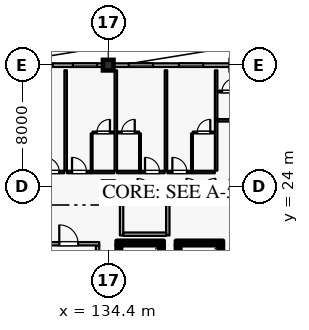
"""IFC4 building model, lengths in metres.
Left out: names, types, materials, properties, quantities, classifications, styles, units other than length and angle.
Written with IfcOpenShell. Run it as: python <this file> out.ifc"""

import sys

from ifc_helpers import new_model, si_unit, direction, frame, frame_2d, origin, origin_2d, place, context, subcontext, project, spatial, rectangle, extrude, element, fill, save


model = new_model("IFC4")
c1 = context("Model", 3, precision=1e-05, world=origin(), true_north=direction((0.0, 1.0)))
c2 = subcontext(c1, "Body", "Model", "MODEL_VIEW")
j1 = project(units=[si_unit("LENGTHUNIT", "METRE"), si_unit("PLANEANGLEUNIT", "RADIAN")], contexts=[c1])
p1 = place(None, origin())
s1 = spatial("IfcSite", under=j1, at=p1, CompositionType="ELEMENT")
p2 = place(p1, origin())
s2 = spatial("IfcBuilding", under=s1, at=p2, CompositionType="ELEMENT")
p3 = place(p2, frame((0.0, 0.0, 28.8)))
s3 = spatial("IfcBuildingStorey", under=s2, at=p3, CompositionType="ELEMENT", Elevation=28.8)
for number, where, z_axis, x_axis in (
    (1, (134.4, 32.0, 0.0), (0.0, 0.0, 1.0), (1.0, 0.0, 0.0)),
    (2, (134.4, 24.0, 0.0), (0.0, 0.0, 1.0), (1.0, 0.0, 0.0)),
):
    element("IfcColumn", number, at=place(p3, frame(where, z_axis=z_axis, x_axis=x_axis)), inside=s3, PredefinedType="COLUMN", context=c2, shape_type="SweptSolid", body=[
        extrude(rectangle(XDim=0.7, YDim=0.7, at=origin_2d()), origin(), (0.0, 0.0, 1.0), 3.6),
    ])
p4 = place(p3, frame((126.35, 32.0, 0.0), z_axis=(0.0, 0.0, 1.0), x_axis=(1.0, 0.0, 0.0)))
e3 = element("IfcWall", 3, at=p4, inside=s3, PredefinedType="SOLIDWALL", context=c2, shape_type="SweptSolid", body=[
    extrude(rectangle(XDim=7.7, YDim=0.24, at=frame_2d((3.85, 0.0))), origin(), (0.0, 0.0, 1.0), 2.93),
])
p5 = place(p4, frame((0.125, 0.0, 0.8)))
e4 = element("IfcOpeningElement", 4, at=p5, cuts=e3, PredefinedType="OPENING", context=c2, shape_type="SweptSolid", body=[
    extrude(rectangle(XDim=1.6, YDim=1.6, at=frame_2d((0.8, 0.8))), frame((0.0, 0.13, 0.0), z_axis=(0.0, -1.0, 0.0), x_axis=(1.0, 0.0, 0.0)), (0.0, 0.0, 1.0), 0.26),
])
p6 = place(p4, frame((2.8, 0.0, 0.8)))
e5 = element("IfcOpeningElement", 5, at=p6, cuts=e3, PredefinedType="OPENING", context=c2, shape_type="SweptSolid", body=[
    extrude(rectangle(XDim=1.6, YDim=1.6, at=frame_2d((0.8, 0.8))), frame((0.0, 0.13, 0.0), z_axis=(0.0, -1.0, 0.0), x_axis=(1.0, 0.0, 0.0)), (0.0, 0.0, 1.0), 0.26),
])
p7 = place(p4, frame((5.725, 0.0, 0.8)))
e6 = element("IfcOpeningElement", 6, at=p7, cuts=e3, PredefinedType="OPENING", context=c2, shape_type="SweptSolid", body=[
    extrude(rectangle(XDim=1.6, YDim=1.6, at=frame_2d((0.8, 0.8))), frame((0.0, 0.13, 0.0), z_axis=(0.0, -1.0, 0.0), x_axis=(1.0, 0.0, 0.0)), (0.0, 0.0, 1.0), 0.26),
])
p8 = place(p3, frame((134.75, 32.0, 0.0), z_axis=(0.0, 0.0, 1.0), x_axis=(1.0, 0.0, 0.0)))
e7 = element("IfcWall", 7, at=p8, inside=s3, PredefinedType="SOLIDWALL", context=c2, shape_type="SweptSolid", body=[
    extrude(rectangle(XDim=7.7, YDim=0.24, at=frame_2d((3.85, 0.0))), origin(), (0.0, 0.0, 1.0), 2.93),
])
p9 = place(p8, frame((1.0, 0.0, 0.8)))
e8 = element("IfcOpeningElement", 8, at=p9, cuts=e7, PredefinedType="OPENING", context=c2, shape_type="SweptSolid", body=[
    extrude(rectangle(XDim=1.6, YDim=1.6, at=frame_2d((0.8, 0.8))), frame((0.0, 0.13, 0.0), z_axis=(0.0, -1.0, 0.0), x_axis=(1.0, 0.0, 0.0)), (0.0, 0.0, 1.0), 0.26),
])
p10 = place(p8, frame((4.3, 0.0, 0.8)))
e9 = element("IfcOpeningElement", 9, at=p10, cuts=e7, PredefinedType="OPENING", context=c2, shape_type="SweptSolid", body=[
    extrude(rectangle(XDim=1.6, YDim=1.6, at=frame_2d((0.8, 0.8))), frame((0.0, 0.13, 0.0), z_axis=(0.0, -1.0, 0.0), x_axis=(1.0, 0.0, 0.0)), (0.0, 0.0, 1.0), 0.26),
])
p11 = place(p3, frame((137.9, 17.555, 0.0), z_axis=(0.0, 0.0, 1.0), x_axis=(0.0, 1.0, 0.0)))
e10 = element("IfcWall", 10, at=p11, inside=s3, PredefinedType="SHEAR", context=c2, shape_type="SweptSolid", body=[
    extrude(rectangle(XDim=2.59, YDim=0.3, at=frame_2d((1.295, 0.0))), origin(), (0.0, 0.0, 1.0), 3.365),
])
p12 = place(p3, frame((138.05, 20.3, 0.0), z_axis=(0.0, 0.0, 1.0), x_axis=(-1.0, 0.0, 0.0)))
e11 = element("IfcWall", 11, at=p12, inside=s3, PredefinedType="SHEAR", context=c2, shape_type="SweptSolid", body=[
    extrude(rectangle(XDim=3.1, YDim=0.3, at=frame_2d((1.55, 0.0))), origin(), (0.0, 0.0, 1.0), 3.365),
])
for number, where, z_axis, x_axis in (
    (12, (135.1, 20.145, 0.0), (0.0, 0.0, 1.0), (0.0, -1.0, 0.0)),
    (13, (141.8, 17.555, 0.0), (0.0, 0.0, 1.0), (0.0, 1.0, 0.0)),
):
    element("IfcWall", number, at=place(p3, frame(where, z_axis=z_axis, x_axis=x_axis)), inside=s3, PredefinedType="SHEAR", context=c2, shape_type="SweptSolid", body=[
        extrude(rectangle(XDim=2.59, YDim=0.3, at=frame_2d((1.295, 0.0))), origin(), (0.0, 0.0, 1.0), 3.365),
    ])
p13 = place(p3, frame((141.95, 20.3, 0.0), z_axis=(0.0, 0.0, 1.0), x_axis=(-1.0, 0.0, 0.0)))
e14 = element("IfcWall", 14, at=p13, inside=s3, PredefinedType="SHEAR", context=c2, shape_type="SweptSolid", body=[
    extrude(rectangle(XDim=3.1, YDim=0.3, at=frame_2d((1.55, 0.0))), origin(), (0.0, 0.0, 1.0), 3.365),
])
p14 = place(p3, frame((139.0, 20.145, 0.0), z_axis=(0.0, 0.0, 1.0), x_axis=(0.0, -1.0, 0.0)))
e15 = element("IfcWall", 15, at=p14, inside=s3, PredefinedType="SHEAR", context=c2, shape_type="SweptSolid", body=[
    extrude(rectangle(XDim=2.59, YDim=0.3, at=frame_2d((1.295, 0.0))), origin(), (0.0, 0.0, 1.0), 3.365),
])
p15 = place(p3, frame((133.7, 16.605, 0.0), z_axis=(0.0, 0.0, 1.0), x_axis=(0.0, 1.0, 0.0)))
e16 = element("IfcWall", 16, at=p15, inside=s3, PredefinedType="PARTITIONING", context=c2, shape_type="SweptSolid", body=[
    extrude(rectangle(XDim=3.53, YDim=0.22, at=frame_2d((1.765, 0.0))), origin(), (0.0, 0.0, 1.0), 3.365),
])
p16 = place(p3, frame((129.79, 20.25, 0.0), z_axis=(0.0, 0.0, 1.0), x_axis=(1.0, 0.0, 0.0)))
e17 = element("IfcWall", 17, at=p16, inside=s3, PredefinedType="PARTITIONING", context=c2, shape_type="SweptSolid", body=[
    extrude(rectangle(XDim=4.02, YDim=0.22, at=frame_2d((2.01, 0.0))), origin(), (0.0, 0.0, 1.0), 3.365),
])
p17 = place(p16, frame((1.39, 0.0, 0.0)))
e18 = element("IfcOpeningElement", 18, at=p17, cuts=e17, PredefinedType="OPENING", context=c2, shape_type="SweptSolid", body=[
    extrude(rectangle(XDim=1.24, YDim=2.2, at=frame_2d((0.62, 1.1))), frame((0.0, 0.12, 0.0), z_axis=(0.0, -1.0, 0.0), x_axis=(1.0, 0.0, 0.0)), (0.0, 0.0, 1.0), 0.24),
])
p18 = place(p3, frame((129.89, 24.97, 0.0), z_axis=(0.0, 0.0, 1.0), x_axis=(1.0, 0.0, 0.0)))
e19 = element("IfcWall", 19, at=p18, inside=s3, PredefinedType="PARTITIONING", context=c2, shape_type="SweptSolid", body=[
    extrude(rectangle(XDim=1.62, YDim=0.16, at=frame_2d((0.81, 0.0))), origin(), (0.0, 0.0, 1.0), 3.365),
])
p19 = place(p18, frame((0.33, 0.0, 0.0)))
e20 = element("IfcOpeningElement", 20, at=p19, cuts=e19, PredefinedType="OPENING", context=c2, shape_type="SweptSolid", body=[
    extrude(rectangle(XDim=0.96, YDim=2.2, at=frame_2d((0.48, 1.1))), frame((0.0, 0.09, 0.0), z_axis=(0.0, -1.0, 0.0), x_axis=(1.0, 0.0, 0.0)), (0.0, 0.0, 1.0), 0.18),
])
p20 = place(p3, frame((131.69, 24.97, 0.0), z_axis=(0.0, 0.0, 1.0), x_axis=(1.0, 0.0, 0.0)))
e21 = element("IfcWall", 21, at=p20, inside=s3, PredefinedType="PARTITIONING", context=c2, shape_type="SweptSolid", body=[
    extrude(rectangle(XDim=1.62, YDim=0.16, at=frame_2d((0.81, 0.0))), origin(), (0.0, 0.0, 1.0), 3.365),
])
p21 = place(p20, frame((0.33, 0.0, 0.0)))
e22 = element("IfcOpeningElement", 22, at=p21, cuts=e21, PredefinedType="OPENING", context=c2, shape_type="SweptSolid", body=[
    extrude(rectangle(XDim=0.96, YDim=2.2, at=frame_2d((0.48, 1.1))), frame((0.0, 0.09, 0.0), z_axis=(0.0, -1.0, 0.0), x_axis=(1.0, 0.0, 0.0)), (0.0, 0.0, 1.0), 0.18),
])
p22 = place(p3, frame((133.32, 24.97, 0.0), z_axis=(0.0, 0.0, 1.0), x_axis=(1.0, 0.0, 0.0)))
e23 = element("IfcWall", 23, at=p22, inside=s3, PredefinedType="PARTITIONING", context=c2, shape_type="SweptSolid", body=[
    extrude(rectangle(XDim=1.49, YDim=0.16, at=frame_2d((0.745, 0.0))), origin(), (0.0, 0.0, 1.0), 3.365),
])
p23 = place(p3, frame((133.31, 25.06, 0.0), z_axis=(0.0, 0.0, 1.0), x_axis=(0.0, 1.0, 0.0)))
e24 = element("IfcWall", 24, at=p23, inside=s3, PredefinedType="PARTITIONING", context=c2, shape_type="SweptSolid", body=[
    extrude(rectangle(XDim=2.45, YDim=0.115, at=frame_2d((1.225, 0.0))), origin(), (0.0, 0.0, 1.0), 3.365),
])
p24 = place(p3, frame((133.37, 27.57, 0.0), z_axis=(0.0, 0.0, 1.0), x_axis=(1.0, 0.0, 0.0)))
e25 = element("IfcWall", 25, at=p24, inside=s3, PredefinedType="PARTITIONING", context=c2, shape_type="SweptSolid", body=[
    extrude(rectangle(XDim=1.43, YDim=0.115, at=frame_2d((0.715, 0.0))), origin(), (0.0, 0.0, 1.0), 3.365),
])
p25 = place(p24, frame((0.285, 0.0, 0.0)))
e26 = element("IfcOpeningElement", 26, at=p25, cuts=e25, PredefinedType="OPENING", context=c2, shape_type="SweptSolid", body=[
    extrude(rectangle(XDim=0.86, YDim=2.12, at=frame_2d((0.43, 1.06))), frame((0.0, 0.067, 0.0), z_axis=(0.0, -1.0, 0.0), x_axis=(1.0, 0.0, 0.0)), (0.0, 0.0, 1.0), 0.135),
])
p26 = place(p3, frame((131.6, 25.06, 0.0), z_axis=(0.0, 0.0, 1.0), x_axis=(0.0, 1.0, 0.0)))
e27 = element("IfcWall", 27, at=p26, inside=s3, PredefinedType="PARTITIONING", context=c2, shape_type="SweptSolid", body=[
    extrude(rectangle(XDim=6.6, YDim=0.16, at=frame_2d((3.3, 0.0))), origin(), (0.0, 0.0, 1.0), 3.365),
])
p27 = place(p3, frame((134.99, 24.97, 0.0), z_axis=(0.0, 0.0, 1.0), x_axis=(1.0, 0.0, 0.0)))
e28 = element("IfcWall", 28, at=p27, inside=s3, PredefinedType="PARTITIONING", context=c2, shape_type="SweptSolid", body=[
    extrude(rectangle(XDim=1.49, YDim=0.16, at=frame_2d((0.745, 0.0))), origin(), (0.0, 0.0, 1.0), 3.365),
])
p28 = place(p3, frame((136.49, 24.97, 0.0), z_axis=(0.0, 0.0, 1.0), x_axis=(1.0, 0.0, 0.0)))
e29 = element("IfcWall", 29, at=p28, inside=s3, PredefinedType="PARTITIONING", context=c2, shape_type="SweptSolid", body=[
    extrude(rectangle(XDim=1.62, YDim=0.16, at=frame_2d((0.81, 0.0))), origin(), (0.0, 0.0, 1.0), 3.365),
])
p29 = place(p28, frame((0.33, 0.0, 0.0)))
e30 = element("IfcOpeningElement", 30, at=p29, cuts=e29, PredefinedType="OPENING", context=c2, shape_type="SweptSolid", body=[
    extrude(rectangle(XDim=0.96, YDim=2.2, at=frame_2d((0.48, 1.1))), frame((0.0, 0.09, 0.0), z_axis=(0.0, -1.0, 0.0), x_axis=(1.0, 0.0, 0.0)), (0.0, 0.0, 1.0), 0.18),
])
p30 = place(p3, frame((136.49, 25.06, 0.0), z_axis=(0.0, 0.0, 1.0), x_axis=(0.0, 1.0, 0.0)))
e31 = element("IfcWall", 31, at=p30, inside=s3, PredefinedType="PARTITIONING", context=c2, shape_type="SweptSolid", body=[
    extrude(rectangle(XDim=2.45, YDim=0.115, at=frame_2d((1.225, 0.0))), origin(), (0.0, 0.0, 1.0), 3.365),
])
p31 = place(p3, frame((135.0, 27.57, 0.0), z_axis=(0.0, 0.0, 1.0), x_axis=(1.0, 0.0, 0.0)))
e32 = element("IfcWall", 32, at=p31, inside=s3, PredefinedType="PARTITIONING", context=c2, shape_type="SweptSolid", body=[
    extrude(rectangle(XDim=1.43, YDim=0.115, at=frame_2d((0.715, 0.0))), origin(), (0.0, 0.0, 1.0), 3.365),
])
p32 = place(p31, frame((0.285, 0.0, 0.0)))
e33 = element("IfcOpeningElement", 33, at=p32, cuts=e32, PredefinedType="OPENING", context=c2, shape_type="SweptSolid", body=[
    extrude(rectangle(XDim=0.86, YDim=2.12, at=frame_2d((0.43, 1.06))), frame((0.0, 0.067, 0.0), z_axis=(0.0, -1.0, 0.0), x_axis=(1.0, 0.0, 0.0)), (0.0, 0.0, 1.0), 0.135),
])
p33 = place(p3, frame((134.9, 25.06, 0.0), z_axis=(0.0, 0.0, 1.0), x_axis=(0.0, 1.0, 0.0)))
e34 = element("IfcWall", 34, at=p33, inside=s3, PredefinedType="PARTITIONING", context=c2, shape_type="SweptSolid", body=[
    extrude(rectangle(XDim=6.6, YDim=0.16, at=frame_2d((3.3, 0.0))), origin(), (0.0, 0.0, 1.0), 3.365),
])
p34 = place(p3, frame((138.29, 24.97, 0.0), z_axis=(0.0, 0.0, 1.0), x_axis=(1.0, 0.0, 0.0)))
e35 = element("IfcWall", 35, at=p34, inside=s3, PredefinedType="PARTITIONING", context=c2, shape_type="SweptSolid", body=[
    extrude(rectangle(XDim=1.62, YDim=0.16, at=frame_2d((0.81, 0.0))), origin(), (0.0, 0.0, 1.0), 3.365),
])
p35 = place(p34, frame((0.33, 0.0, 0.0)))
e36 = element("IfcOpeningElement", 36, at=p35, cuts=e35, PredefinedType="OPENING", context=c2, shape_type="SweptSolid", body=[
    extrude(rectangle(XDim=0.96, YDim=2.2, at=frame_2d((0.48, 1.1))), frame((0.0, 0.09, 0.0), z_axis=(0.0, -1.0, 0.0), x_axis=(1.0, 0.0, 0.0)), (0.0, 0.0, 1.0), 0.18),
])
p36 = place(p3, frame((139.92, 24.97, 0.0), z_axis=(0.0, 0.0, 1.0), x_axis=(1.0, 0.0, 0.0)))
e37 = element("IfcWall", 37, at=p36, inside=s3, PredefinedType="PARTITIONING", context=c2, shape_type="SweptSolid", body=[
    extrude(rectangle(XDim=1.49, YDim=0.16, at=frame_2d((0.745, 0.0))), origin(), (0.0, 0.0, 1.0), 3.365),
])
p37 = place(p3, frame((139.91, 25.06, 0.0), z_axis=(0.0, 0.0, 1.0), x_axis=(0.0, 1.0, 0.0)))
e38 = element("IfcWall", 38, at=p37, inside=s3, PredefinedType="PARTITIONING", context=c2, shape_type="SweptSolid", body=[
    extrude(rectangle(XDim=2.45, YDim=0.115, at=frame_2d((1.225, 0.0))), origin(), (0.0, 0.0, 1.0), 3.365),
])
p38 = place(p3, frame((139.97, 27.57, 0.0), z_axis=(0.0, 0.0, 1.0), x_axis=(1.0, 0.0, 0.0)))
e39 = element("IfcWall", 39, at=p38, inside=s3, PredefinedType="PARTITIONING", context=c2, shape_type="SweptSolid", body=[
    extrude(rectangle(XDim=1.43, YDim=0.115, at=frame_2d((0.715, 0.0))), origin(), (0.0, 0.0, 1.0), 3.365),
])
p39 = place(p38, frame((0.285, 0.0, 0.0)))
e40 = element("IfcOpeningElement", 40, at=p39, cuts=e39, PredefinedType="OPENING", context=c2, shape_type="SweptSolid", body=[
    extrude(rectangle(XDim=0.86, YDim=2.12, at=frame_2d((0.43, 1.06))), frame((0.0, 0.067, 0.0), z_axis=(0.0, -1.0, 0.0), x_axis=(1.0, 0.0, 0.0)), (0.0, 0.0, 1.0), 0.135),
])
p40 = place(p3, frame((138.2, 25.06, 0.0), z_axis=(0.0, 0.0, 1.0), x_axis=(0.0, 1.0, 0.0)))
e41 = element("IfcWall", 41, at=p40, inside=s3, PredefinedType="PARTITIONING", context=c2, shape_type="SweptSolid", body=[
    extrude(rectangle(XDim=6.6, YDim=0.16, at=frame_2d((3.3, 0.0))), origin(), (0.0, 0.0, 1.0), 3.365),
])
p41 = place(p3, frame((141.5, 25.06, 0.0), z_axis=(0.0, 0.0, 1.0), x_axis=(0.0, 1.0, 0.0)))
e42 = element("IfcWall", 42, at=p41, inside=s3, PredefinedType="PARTITIONING", context=c2, shape_type="SweptSolid", body=[
    extrude(rectangle(XDim=3.39, YDim=0.16, at=frame_2d((1.695, 0.0))), origin(), (0.0, 0.0, 1.0), 3.365),
])
p42 = place(p3, frame((141.59, 28.37, 0.0), z_axis=(0.0, 0.0, 1.0), x_axis=(1.0, 0.0, 0.0)))
e43 = element("IfcWall", 43, at=p42, inside=s3, PredefinedType="PARTITIONING", context=c2, shape_type="SweptSolid", body=[
    extrude(rectangle(XDim=1.49, YDim=0.16, at=frame_2d((0.745, 0.0))), origin(), (0.0, 0.0, 1.0), 3.365),
])
p43 = place(p3, frame((141.6, 30.26, 0.0), z_axis=(0.0, 0.0, 1.0), x_axis=(1.0, 0.0, 0.0)))
e44 = element("IfcWall", 44, at=p43, inside=s3, PredefinedType="PARTITIONING", context=c2, shape_type="SweptSolid", body=[
    extrude(rectangle(XDim=1.43, YDim=0.115, at=frame_2d((0.715, 0.0))), origin(), (0.0, 0.0, 1.0), 3.365),
])
p44 = place(p43, frame((0.285, 0.0, 0.0)))
e45 = element("IfcOpeningElement", 45, at=p44, cuts=e44, PredefinedType="OPENING", context=c2, shape_type="SweptSolid", body=[
    extrude(rectangle(XDim=0.86, YDim=2.12, at=frame_2d((0.43, 1.06))), frame((0.0, 0.067, 0.0), z_axis=(0.0, -1.0, 0.0), x_axis=(1.0, 0.0, 0.0)), (0.0, 0.0, 1.0), 0.135),
])
p45 = place(p3, frame((141.5, 28.46, 0.0), z_axis=(0.0, 0.0, 1.0), x_axis=(0.0, 1.0, 0.0)))
e46 = element("IfcWall", 46, at=p45, inside=s3, PredefinedType="PARTITIONING", context=c2, shape_type="SweptSolid", body=[
    extrude(rectangle(XDim=3.2, YDim=0.16, at=frame_2d((1.6, 0.0))), origin(), (0.0, 0.0, 1.0), 3.365),
])
p46 = place(p3, frame((138.96, 23.6, 0.0), z_axis=(0.0, 0.0, 1.0), x_axis=(1.0, 0.0, 0.0)))
e47 = element("IfcWall", 47, at=p46, inside=s3, PredefinedType="PARTITIONING", context=c2, shape_type="SweptSolid", body=[
    extrude(rectangle(XDim=3.08, YDim=0.14, at=frame_2d((1.54, 0.0))), origin(), (0.0, 0.0, 1.0), 3.365),
])
p47 = place(p46, frame((0.59, 0.0, 0.0)))
e48 = element("IfcOpeningElement", 48, at=p47, cuts=e47, PredefinedType="OPENING", context=c2, shape_type="SweptSolid", body=[
    extrude(rectangle(XDim=1.9, YDim=2.4, at=frame_2d((0.95, 1.2))), frame((0.0, 0.08, 0.0), z_axis=(0.0, -1.0, 0.0), x_axis=(1.0, 0.0, 0.0)), (0.0, 0.0, 1.0), 0.16),
])
p48 = place(p3, frame((135.36, 23.6, 0.0), z_axis=(0.0, 0.0, 1.0), x_axis=(1.0, 0.0, 0.0)))
e49 = element("IfcWall", 49, at=p48, inside=s3, PredefinedType="PARTITIONING", context=c2, shape_type="SweptSolid", body=[
    extrude(rectangle(XDim=2.88, YDim=0.22, at=frame_2d((1.44, 0.0))), origin(), (0.0, 0.0, 1.0), 3.365),
])
p49 = place(p48, frame((0.97, 0.0, 0.0)))
e50 = element("IfcOpeningElement", 50, at=p49, cuts=e49, PredefinedType="OPENING", context=c2, shape_type="SweptSolid", body=[
    extrude(rectangle(XDim=0.94, YDim=2.15, at=frame_2d((0.47, 1.075))), frame((0.0, 0.12, 0.0), z_axis=(0.0, -1.0, 0.0), x_axis=(1.0, 0.0, 0.0)), (0.0, 0.0, 1.0), 0.24),
])
for number, where, z_axis, x_axis in (
    (51, (135.28, 20.8, 0.0), (0.0, 0.0, 1.0), (0.0, 1.0, 0.0)),
    (52, (138.32, 20.8, 0.0), (0.0, 0.0, 1.0), (0.0, 1.0, 0.0)),
):
    element("IfcWall", number, at=place(p3, frame(where, z_axis=z_axis, x_axis=x_axis)), inside=s3, PredefinedType="PARTITIONING", context=c2, shape_type="SweptSolid", body=[
        extrude(rectangle(XDim=2.748, YDim=0.22, at=frame_2d((1.374, 0.0))), origin(), (0.0, 0.0, 1.0), 3.365),
    ])
p50 = place(p3, frame((135.39, 20.88, 0.0), z_axis=(0.0, 0.0, 1.0), x_axis=(1.0, 0.0, 0.0)))
e53 = element("IfcWall", 53, at=p50, inside=s3, PredefinedType="PARTITIONING", context=c2, shape_type="SweptSolid", body=[
    extrude(rectangle(XDim=2.82, YDim=0.22, at=frame_2d((1.41, 0.0))), origin(), (0.0, 0.0, 1.0), 3.365),
])
p51 = place(p6, origin())
e54 = element("IfcWindow", 54, at=p51, inside=s3, PartitioningType="SINGLE_PANEL", PredefinedType="WINDOW", context=c2, shape_type="SweptSolid", body=[
    extrude(rectangle(XDim=1.6, YDim=1.6, at=frame_2d((0.8, 0.8))), frame((0.0, 0.03, 0.0), z_axis=(0.0, -1.0, 0.0), x_axis=(1.0, 0.0, 0.0)), (0.0, 0.0, 1.0), 0.06),
])
fill(e5, e54)
p52 = place(p7, origin())
e55 = element("IfcWindow", 55, at=p52, inside=s3, PartitioningType="SINGLE_PANEL", PredefinedType="WINDOW", context=c2, shape_type="SweptSolid", body=[
    extrude(rectangle(XDim=1.6, YDim=1.6, at=frame_2d((0.8, 0.8))), frame((0.0, 0.03, 0.0), z_axis=(0.0, -1.0, 0.0), x_axis=(1.0, 0.0, 0.0)), (0.0, 0.0, 1.0), 0.06),
])
fill(e6, e55)
p53 = place(p9, origin())
e56 = element("IfcWindow", 56, at=p53, inside=s3, PartitioningType="SINGLE_PANEL", PredefinedType="WINDOW", context=c2, shape_type="SweptSolid", body=[
    extrude(rectangle(XDim=1.6, YDim=1.6, at=frame_2d((0.8, 0.8))), frame((0.0, 0.03, 0.0), z_axis=(0.0, -1.0, 0.0), x_axis=(1.0, 0.0, 0.0)), (0.0, 0.0, 1.0), 0.06),
])
fill(e8, e56)
p54 = place(p10, origin())
e57 = element("IfcWindow", 57, at=p54, inside=s3, PartitioningType="SINGLE_PANEL", PredefinedType="WINDOW", context=c2, shape_type="SweptSolid", body=[
    extrude(rectangle(XDim=1.6, YDim=1.6, at=frame_2d((0.8, 0.8))), frame((0.0, 0.03, 0.0), z_axis=(0.0, -1.0, 0.0), x_axis=(1.0, 0.0, 0.0)), (0.0, 0.0, 1.0), 0.06),
])
fill(e9, e57)
p55 = place(p17, origin())
e58 = element("IfcDoor", 58, at=p55, inside=s3, OperationType="SINGLE_SWING_LEFT", PredefinedType="DOOR", context=c2, shape_type="SweptSolid", body=[
    extrude(rectangle(XDim=1.24, YDim=2.2, at=frame_2d((0.62, 1.1))), frame((0.0, 0.025, 0.0), z_axis=(0.0, -1.0, 0.0), x_axis=(1.0, 0.0, 0.0)), (0.0, 0.0, 1.0), 0.05),
])
fill(e18, e58)
p56 = place(p19, origin())
e59 = element("IfcDoor", 59, at=p56, inside=s3, OperationType="SINGLE_SWING_LEFT", PredefinedType="DOOR", context=c2, shape_type="SweptSolid", body=[
    extrude(rectangle(XDim=0.96, YDim=2.2, at=frame_2d((0.48, 1.1))), frame((0.0, 0.025, 0.0), z_axis=(0.0, -1.0, 0.0), x_axis=(1.0, 0.0, 0.0)), (0.0, 0.0, 1.0), 0.05),
])
fill(e20, e59)
p57 = place(p21, origin())
e60 = element("IfcDoor", 60, at=p57, inside=s3, OperationType="SINGLE_SWING_LEFT", PredefinedType="DOOR", context=c2, shape_type="SweptSolid", body=[
    extrude(rectangle(XDim=0.96, YDim=2.2, at=frame_2d((0.48, 1.1))), frame((0.0, 0.025, 0.0), z_axis=(0.0, -1.0, 0.0), x_axis=(1.0, 0.0, 0.0)), (0.0, 0.0, 1.0), 0.05),
])
fill(e22, e60)
p58 = place(p25, origin())
e61 = element("IfcDoor", 61, at=p58, inside=s3, OperationType="SINGLE_SWING_RIGHT", PredefinedType="DOOR", context=c2, shape_type="SweptSolid", body=[
    extrude(rectangle(XDim=0.86, YDim=2.12, at=frame_2d((0.43, 1.06))), frame((0.0, 0.025, 0.0), z_axis=(0.0, -1.0, 0.0), x_axis=(1.0, 0.0, 0.0)), (0.0, 0.0, 1.0), 0.05),
])
fill(e26, e61)
p59 = place(p29, origin())
e62 = element("IfcDoor", 62, at=p59, inside=s3, OperationType="SINGLE_SWING_LEFT", PredefinedType="DOOR", context=c2, shape_type="SweptSolid", body=[
    extrude(rectangle(XDim=0.96, YDim=2.2, at=frame_2d((0.48, 1.1))), frame((0.0, 0.025, 0.0), z_axis=(0.0, -1.0, 0.0), x_axis=(1.0, 0.0, 0.0)), (0.0, 0.0, 1.0), 0.05),
])
fill(e30, e62)
p60 = place(p32, origin())
e63 = element("IfcDoor", 63, at=p60, inside=s3, OperationType="SINGLE_SWING_RIGHT", PredefinedType="DOOR", context=c2, shape_type="SweptSolid", body=[
    extrude(rectangle(XDim=0.86, YDim=2.12, at=frame_2d((0.43, 1.06))), frame((0.0, 0.025, 0.0), z_axis=(0.0, -1.0, 0.0), x_axis=(1.0, 0.0, 0.0)), (0.0, 0.0, 1.0), 0.05),
])
fill(e33, e63)
p61 = place(p35, origin())
e64 = element("IfcDoor", 64, at=p61, inside=s3, OperationType="SINGLE_SWING_LEFT", PredefinedType="DOOR", context=c2, shape_type="SweptSolid", body=[
    extrude(rectangle(XDim=0.96, YDim=2.2, at=frame_2d((0.48, 1.1))), frame((0.0, 0.025, 0.0), z_axis=(0.0, -1.0, 0.0), x_axis=(1.0, 0.0, 0.0)), (0.0, 0.0, 1.0), 0.05),
])
fill(e36, e64)
p62 = place(p39, origin())
e65 = element("IfcDoor", 65, at=p62, inside=s3, OperationType="SINGLE_SWING_RIGHT", PredefinedType="DOOR", context=c2, shape_type="SweptSolid", body=[
    extrude(rectangle(XDim=0.86, YDim=2.12, at=frame_2d((0.43, 1.06))), frame((0.0, 0.025, 0.0), z_axis=(0.0, -1.0, 0.0), x_axis=(1.0, 0.0, 0.0)), (0.0, 0.0, 1.0), 0.05),
])
fill(e40, e65)
p63 = place(p44, origin())
e66 = element("IfcDoor", 66, at=p63, inside=s3, OperationType="SINGLE_SWING_RIGHT", PredefinedType="DOOR", context=c2, shape_type="SweptSolid", body=[
    extrude(rectangle(XDim=0.86, YDim=2.12, at=frame_2d((0.43, 1.06))), frame((0.0, 0.025, 0.0), z_axis=(0.0, -1.0, 0.0), x_axis=(1.0, 0.0, 0.0)), (0.0, 0.0, 1.0), 0.05),
])
fill(e45, e66)
p64 = place(p47, origin())
e67 = element("IfcDoor", 67, at=p64, inside=s3, OperationType="DOUBLE_DOOR_SINGLE_SWING", PredefinedType="DOOR", context=c2, shape_type="SweptSolid", body=[
    extrude(rectangle(XDim=1.9, YDim=2.4, at=frame_2d((0.95, 1.2))), frame((0.0, 0.025, 0.0), z_axis=(0.0, -1.0, 0.0), x_axis=(1.0, 0.0, 0.0)), (0.0, 0.0, 1.0), 0.05),
])
fill(e48, e67)
p65 = place(p49, origin())
e68 = element("IfcDoor", 68, at=p65, inside=s3, OperationType="SINGLE_SWING_LEFT", PredefinedType="DOOR", context=c2, shape_type="SweptSolid", body=[
    extrude(rectangle(XDim=0.94, YDim=2.15, at=frame_2d((0.47, 1.075))), frame((0.0, 0.025, 0.0), z_axis=(0.0, -1.0, 0.0), x_axis=(1.0, 0.0, 0.0)), (0.0, 0.0, 1.0), 0.05),
])
fill(e50, e68)
save(model, sys.argv[1])
